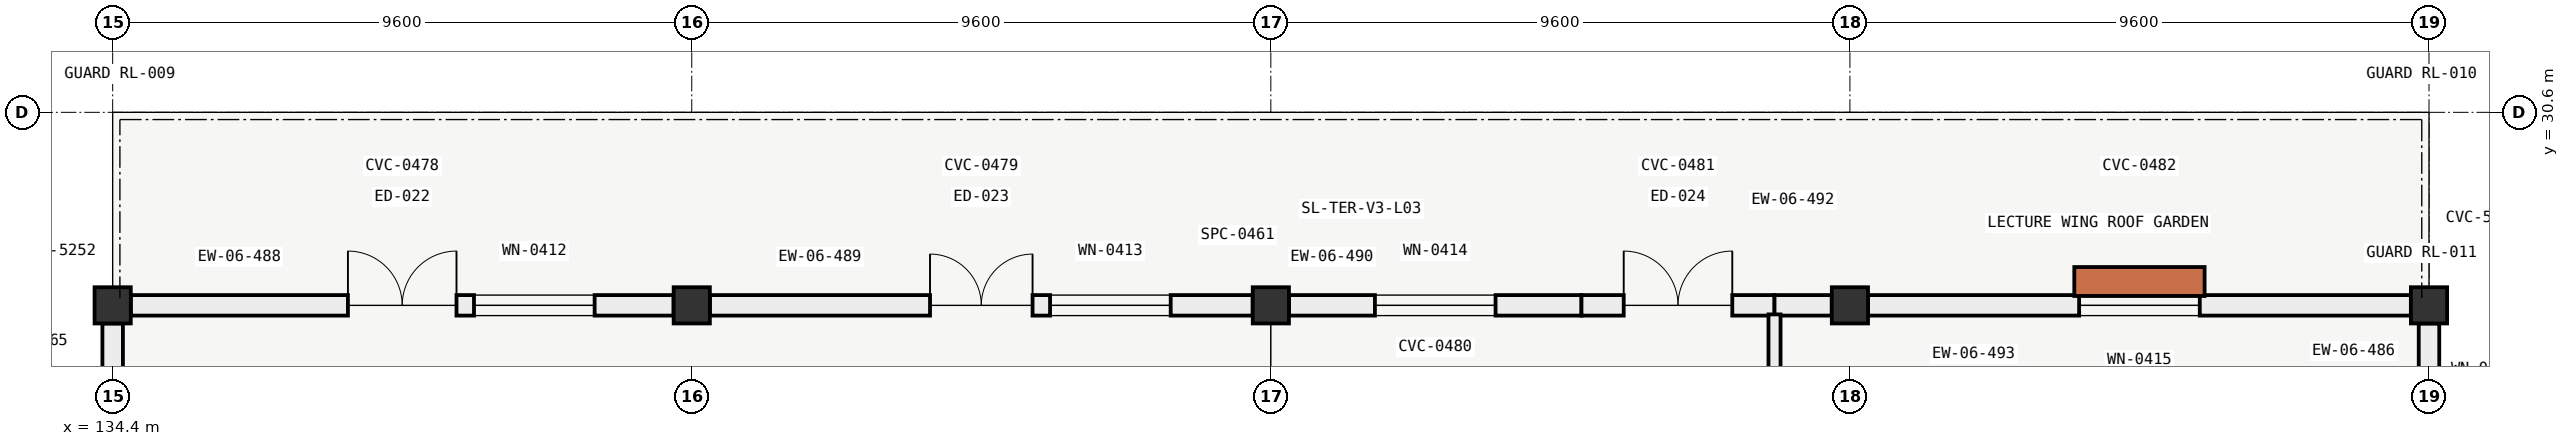
"""IFC4 building model, lengths in metres.
Left out: names, types, materials, properties, quantities, classifications, styles, units other than length and angle.
Written with IfcOpenShell. Run it as: python <this file> out.ifc"""

import sys

from ifc_helpers import new_model, si_unit, direction, frame, frame_2d, origin, origin_2d, place, context, subcontext, project, spatial, rectangle, extrude, element, fill, save


model = new_model("IFC4")
c1 = context("Model", 3, precision=1e-05, world=origin(), true_north=direction((0.0, 1.0)))
c2 = subcontext(c1, "Body", "Model", "MODEL_VIEW")
j1 = project(units=[si_unit("LENGTHUNIT", "METRE"), si_unit("PLANEANGLEUNIT", "RADIAN")], contexts=[c1])
p1 = place(None, origin())
s1 = spatial("IfcSite", under=j1, at=p1, CompositionType="ELEMENT")
p2 = place(p1, origin())
s2 = spatial("IfcBuilding", under=s1, at=p2, CompositionType="ELEMENT")
p3 = place(p2, frame((0.0, 0.0, 13.8)))
s3 = spatial("IfcBuildingStorey", under=s2, at=p3, CompositionType="ELEMENT", Elevation=13.8)
for number, where, z_axis, x_axis in (
    (1, (134.4, 27.4, 0.0), (0.0, 0.0, 1.0), (1.0, 0.0, 0.0)),
    (2, (144.0, 27.4, 0.0), (0.0, 0.0, 1.0), (1.0, 0.0, 0.0)),
    (3, (153.6, 27.4, 0.0), (0.0, 0.0, 1.0), (1.0, 0.0, 0.0)),
    (4, (163.2, 27.4, 0.0), (0.0, 0.0, 1.0), (1.0, 0.0, 0.0)),
    (5, (172.8, 27.4, 0.0), (0.0, 0.0, 1.0), (1.0, 0.0, 0.0)),
):
    element("IfcColumn", number, at=place(p3, frame(where, z_axis=z_axis, x_axis=x_axis)), inside=s3, PredefinedType="COLUMN", context=c2, shape_type="SweptSolid", body=[
        extrude(rectangle(XDim=0.6, YDim=0.6, at=origin_2d()), origin(), (0.0, 0.0, 1.0), 4.2),
    ])
p4 = place(p3, frame((134.4, 24.501, 0.0), z_axis=(0.0, 0.0, 1.0), x_axis=(0.0, 1.0, 0.0)))
e6 = element("IfcWall", 6, at=p4, inside=s3, PredefinedType="SOLIDWALL", context=c2, shape_type="SweptSolid", body=[
    extrude(rectangle(XDim=2.598, YDim=0.34, at=frame_2d((1.299, 0.0))), origin(), (0.0, 0.0, 1.0), 3.28),
])
p5 = place(p4, frame((0.924, 0.0, 0.75)))
e7 = element("IfcOpeningElement", 7, at=p5, cuts=e6, PredefinedType="OPENING", context=c2, shape_type="SweptSolid", body=[
    extrude(rectangle(XDim=0.75, YDim=1.1, at=frame_2d((0.375, 0.55))), frame((0.0, 0.18, 0.0), z_axis=(0.0, -1.0, 0.0), x_axis=(1.0, 0.0, 0.0)), (0.0, 0.0, 1.0), 0.36),
])
p6 = place(p3, frame((172.8, 27.099, 0.0), z_axis=(0.0, 0.0, 1.0), x_axis=(0.0, -1.0, 0.0)))
e8 = element("IfcWall", 8, at=p6, inside=s3, PredefinedType="SOLIDWALL", context=c2, shape_type="SweptSolid", body=[
    extrude(rectangle(XDim=2.598, YDim=0.34, at=frame_2d((1.299, 0.0))), origin(), (0.0, 0.0, 1.0), 3.28),
])
p7 = place(p6, frame((0.924, 0.0, 0.85)))
e9 = element("IfcOpeningElement", 9, at=p7, cuts=e8, PredefinedType="OPENING", context=c2, shape_type="SweptSolid", body=[
    extrude(rectangle(XDim=0.75, YDim=1.1, at=frame_2d((0.375, 0.55))), frame((0.0, 0.18, 0.0), z_axis=(0.0, -1.0, 0.0), x_axis=(1.0, 0.0, 0.0)), (0.0, 0.0, 1.0), 0.36),
])
p8 = place(p3, frame((134.701, 27.4, 0.0), z_axis=(0.0, 0.0, 1.0), x_axis=(1.0, 0.0, 0.0)))
e10 = element("IfcWall", 10, at=p8, inside=s3, PredefinedType="SOLIDWALL", context=c2, shape_type="SweptSolid", body=[
    extrude(rectangle(XDim=8.998, YDim=0.34, at=frame_2d((4.499, 0.0))), origin(), (0.0, 0.0, 1.0), 3.28),
])
p9 = place(p8, frame((3.599, 0.0, 0.0)))
e11 = element("IfcOpeningElement", 11, at=p9, cuts=e10, PredefinedType="OPENING", context=c2, shape_type="SweptSolid", body=[
    extrude(rectangle(XDim=1.8, YDim=2.2, at=frame_2d((0.9, 1.1))), frame((0.0, 0.18, 0.0), z_axis=(0.0, -1.0, 0.0), x_axis=(1.0, 0.0, 0.0)), (0.0, 0.0, 1.0), 0.36),
])
p10 = place(p8, frame((5.689, 0.0, 0.85)))
e12 = element("IfcOpeningElement", 12, at=p10, cuts=e10, PredefinedType="OPENING", context=c2, shape_type="SweptSolid", body=[
    extrude(rectangle(XDim=2.0, YDim=1.35, at=frame_2d((1.0, 0.675))), frame((0.0, 0.18, 0.0), z_axis=(0.0, -1.0, 0.0), x_axis=(1.0, 0.0, 0.0)), (0.0, 0.0, 1.0), 0.36),
])
p11 = place(p3, frame((144.301, 27.4, 0.0), z_axis=(0.0, 0.0, 1.0), x_axis=(1.0, 0.0, 0.0)))
e13 = element("IfcWall", 13, at=p11, inside=s3, PredefinedType="SOLIDWALL", context=c2, shape_type="SweptSolid", body=[
    extrude(rectangle(XDim=8.998, YDim=0.34, at=frame_2d((4.499, 0.0))), origin(), (0.0, 0.0, 1.0), 3.28),
])
p12 = place(p11, frame((3.649, 0.0, 0.0)))
e14 = element("IfcOpeningElement", 14, at=p12, cuts=e13, PredefinedType="OPENING", context=c2, shape_type="SweptSolid", body=[
    extrude(rectangle(XDim=1.7, YDim=2.15, at=frame_2d((0.85, 1.075))), frame((0.0, 0.18, 0.0), z_axis=(0.0, -1.0, 0.0), x_axis=(1.0, 0.0, 0.0)), (0.0, 0.0, 1.0), 0.36),
])
p13 = place(p11, frame((5.639, 0.0, 0.85)))
e15 = element("IfcOpeningElement", 15, at=p13, cuts=e13, PredefinedType="OPENING", context=c2, shape_type="SweptSolid", body=[
    extrude(rectangle(XDim=2.0, YDim=1.35, at=frame_2d((1.0, 0.675))), frame((0.0, 0.18, 0.0), z_axis=(0.0, -1.0, 0.0), x_axis=(1.0, 0.0, 0.0)), (0.0, 0.0, 1.0), 0.36),
])
p14 = place(p3, frame((153.901, 27.4, 0.0), z_axis=(0.0, 0.0, 1.0), x_axis=(1.0, 0.0, 0.0)))
e16 = element("IfcWall", 16, at=p14, inside=s3, PredefinedType="SOLIDWALL", context=c2, shape_type="SweptSolid", body=[
    extrude(rectangle(XDim=4.849, YDim=0.34, at=frame_2d((2.425, 0.0))), origin(), (0.0, 0.0, 1.0), 3.28),
])
p15 = place(p14, frame((1.425, 0.0, 0.85)))
e17 = element("IfcOpeningElement", 17, at=p15, cuts=e16, PredefinedType="OPENING", context=c2, shape_type="SweptSolid", body=[
    extrude(rectangle(XDim=2.0, YDim=1.35, at=frame_2d((1.0, 0.675))), frame((0.0, 0.18, 0.0), z_axis=(0.0, -1.0, 0.0), x_axis=(1.0, 0.0, 0.0)), (0.0, 0.0, 1.0), 0.36),
])
p16 = place(p3, frame((158.75, 27.4, 0.0), z_axis=(0.0, 0.0, 1.0), x_axis=(1.0, 0.0, 0.0)))
e18 = element("IfcWall", 18, at=p16, inside=s3, PredefinedType="SOLIDWALL", context=c2, shape_type="SweptSolid", body=[
    extrude(rectangle(XDim=3.2, YDim=0.34, at=frame_2d((1.6, 0.0))), origin(), (0.0, 0.0, 1.0), 3.28),
])
p17 = place(p16, frame((0.7, 0.0, 0.0)))
e19 = element("IfcOpeningElement", 19, at=p17, cuts=e18, PredefinedType="OPENING", context=c2, shape_type="SweptSolid", body=[
    extrude(rectangle(XDim=1.8, YDim=2.2, at=frame_2d((0.9, 1.1))), frame((0.0, 0.18, 0.0), z_axis=(0.0, -1.0, 0.0), x_axis=(1.0, 0.0, 0.0)), (0.0, 0.0, 1.0), 0.36),
])
p18 = place(p3, frame((161.95, 27.4, 0.0), z_axis=(0.0, 0.0, 1.0), x_axis=(1.0, 0.0, 0.0)))
e20 = element("IfcWall", 20, at=p18, inside=s3, PredefinedType="SOLIDWALL", context=c2, shape_type="SweptSolid", body=[
    extrude(rectangle(XDim=0.949, YDim=0.34, at=frame_2d((0.475, 0.0))), origin(), (0.0, 0.0, 1.0), 3.28),
])
p19 = place(p3, frame((163.501, 27.4, 0.0), z_axis=(0.0, 0.0, 1.0), x_axis=(1.0, 0.0, 0.0)))
e21 = element("IfcWall", 21, at=p19, inside=s3, PredefinedType="SOLIDWALL", context=c2, shape_type="SweptSolid", body=[
    extrude(rectangle(XDim=8.998, YDim=0.34, at=frame_2d((4.499, 0.0))), origin(), (0.0, 0.0, 1.0), 3.28),
])
p20 = place(p19, frame((3.499, 0.0, 0.85)))
e22 = element("IfcOpeningElement", 22, at=p20, cuts=e21, PredefinedType="OPENING", context=c2, shape_type="SweptSolid", body=[
    extrude(rectangle(XDim=2.0, YDim=1.35, at=frame_2d((1.0, 0.675))), frame((0.0, 0.18, 0.0), z_axis=(0.0, -1.0, 0.0), x_axis=(1.0, 0.0, 0.0)), (0.0, 0.0, 1.0), 0.36),
])
p21 = place(p3, frame((161.95, 0.15, 0.0), z_axis=(0.0, 0.0, 1.0), x_axis=(0.0, 1.0, 0.0)))
e23 = element("IfcWall", 23, at=p21, inside=s3, PredefinedType="PARTITIONING", context=c2, shape_type="SweptSolid", body=[
    extrude(rectangle(XDim=27.1, YDim=0.2, at=frame_2d((13.55, 0.0))), origin(), (0.0, 0.0, 1.0), 3.23),
])
p22 = place(p21, frame((5.0, 0.0, 0.0)))
e24 = element("IfcOpeningElement", 24, at=p22, cuts=e23, PredefinedType="OPENING", context=c2, shape_type="SweptSolid", body=[
    extrude(rectangle(XDim=1.4, YDim=2.2, at=frame_2d((0.7, 1.1))), frame((0.0, 0.11, 0.0), z_axis=(0.0, -1.0, 0.0), x_axis=(1.0, 0.0, 0.0)), (0.0, 0.0, 1.0), 0.22),
])
p23 = place(p21, frame((12.0, 0.0, 0.0)))
e25 = element("IfcOpeningElement", 25, at=p23, cuts=e23, PredefinedType="OPENING", context=c2, shape_type="SweptSolid", body=[
    extrude(rectangle(XDim=0.95, YDim=2.1, at=frame_2d((0.475, 1.05))), frame((0.0, 0.11, 0.0), z_axis=(0.0, -1.0, 0.0), x_axis=(1.0, 0.0, 0.0)), (0.0, 0.0, 1.0), 0.22),
])
p24 = place(p21, frame((16.15, 0.0, 0.0)))
e26 = element("IfcOpeningElement", 26, at=p24, cuts=e23, PredefinedType="OPENING", context=c2, shape_type="SweptSolid", body=[
    extrude(rectangle(XDim=0.9, YDim=2.05, at=frame_2d((0.45, 1.025))), frame((0.0, 0.11, 0.0), z_axis=(0.0, -1.0, 0.0), x_axis=(1.0, 0.0, 0.0)), (0.0, 0.0, 1.0), 0.22),
])
p25 = place(p21, frame((21.1, 0.0, 0.0)))
e27 = element("IfcOpeningElement", 27, at=p25, cuts=e23, PredefinedType="OPENING", context=c2, shape_type="SweptSolid", body=[
    extrude(rectangle(XDim=1.4, YDim=2.2, at=frame_2d((0.7, 1.1))), frame((0.0, 0.11, 0.0), z_axis=(0.0, -1.0, 0.0), x_axis=(1.0, 0.0, 0.0)), (0.0, 0.0, 1.0), 0.22),
])
p26 = place(p9, origin())
e28 = element("IfcDoor", 28, at=p26, inside=s3, OperationType="DOUBLE_DOOR_SINGLE_SWING", PredefinedType="DOOR", context=c2, shape_type="SweptSolid", body=[
    extrude(rectangle(XDim=1.8, YDim=2.2, at=frame_2d((0.9, 1.1))), frame((0.0, 0.025, 0.0), z_axis=(0.0, -1.0, 0.0), x_axis=(1.0, 0.0, 0.0)), (0.0, 0.0, 1.0), 0.05),
])
fill(e11, e28)
p27 = place(p10, origin())
e29 = element("IfcWindow", 29, at=p27, inside=s3, PartitioningType="SINGLE_PANEL", PredefinedType="WINDOW", context=c2, shape_type="SweptSolid", body=[
    extrude(rectangle(XDim=2.0, YDim=1.35, at=frame_2d((1.0, 0.675))), frame((0.0, 0.03, 0.0), z_axis=(0.0, -1.0, 0.0), x_axis=(1.0, 0.0, 0.0)), (0.0, 0.0, 1.0), 0.06),
])
fill(e12, e29)
p28 = place(p12, origin())
e30 = element("IfcDoor", 30, at=p28, inside=s3, OperationType="DOUBLE_DOOR_SINGLE_SWING", PredefinedType="DOOR", context=c2, shape_type="SweptSolid", body=[
    extrude(rectangle(XDim=1.7, YDim=2.15, at=frame_2d((0.85, 1.075))), frame((0.0, 0.025, 0.0), z_axis=(0.0, -1.0, 0.0), x_axis=(1.0, 0.0, 0.0)), (0.0, 0.0, 1.0), 0.05),
])
fill(e14, e30)
p29 = place(p13, origin())
e31 = element("IfcWindow", 31, at=p29, inside=s3, PartitioningType="SINGLE_PANEL", PredefinedType="WINDOW", context=c2, shape_type="SweptSolid", body=[
    extrude(rectangle(XDim=2.0, YDim=1.35, at=frame_2d((1.0, 0.675))), frame((0.0, 0.03, 0.0), z_axis=(0.0, -1.0, 0.0), x_axis=(1.0, 0.0, 0.0)), (0.0, 0.0, 1.0), 0.06),
])
fill(e15, e31)
p30 = place(p15, origin())
e32 = element("IfcWindow", 32, at=p30, inside=s3, PartitioningType="SINGLE_PANEL", PredefinedType="WINDOW", context=c2, shape_type="SweptSolid", body=[
    extrude(rectangle(XDim=2.0, YDim=1.35, at=frame_2d((1.0, 0.675))), frame((0.0, 0.03, 0.0), z_axis=(0.0, -1.0, 0.0), x_axis=(1.0, 0.0, 0.0)), (0.0, 0.0, 1.0), 0.06),
])
fill(e17, e32)
p31 = place(p17, origin())
e33 = element("IfcDoor", 33, at=p31, inside=s3, OperationType="DOUBLE_DOOR_SINGLE_SWING", PredefinedType="DOOR", context=c2, shape_type="SweptSolid", body=[
    extrude(rectangle(XDim=1.8, YDim=2.2, at=frame_2d((0.9, 1.1))), frame((0.0, 0.025, 0.0), z_axis=(0.0, -1.0, 0.0), x_axis=(1.0, 0.0, 0.0)), (0.0, 0.0, 1.0), 0.05),
])
fill(e19, e33)
p32 = place(p20, origin())
e34 = element("IfcWindow", 34, at=p32, inside=s3, PartitioningType="SINGLE_PANEL", PredefinedType="WINDOW", context=c2, shape_type="SweptSolid", body=[
    extrude(rectangle(XDim=2.0, YDim=1.35, at=frame_2d((1.0, 0.675))), frame((0.0, 0.03, 0.0), z_axis=(0.0, -1.0, 0.0), x_axis=(1.0, 0.0, 0.0)), (0.0, 0.0, 1.0), 0.06),
])
fill(e22, e34)
save(model, sys.argv[1])
